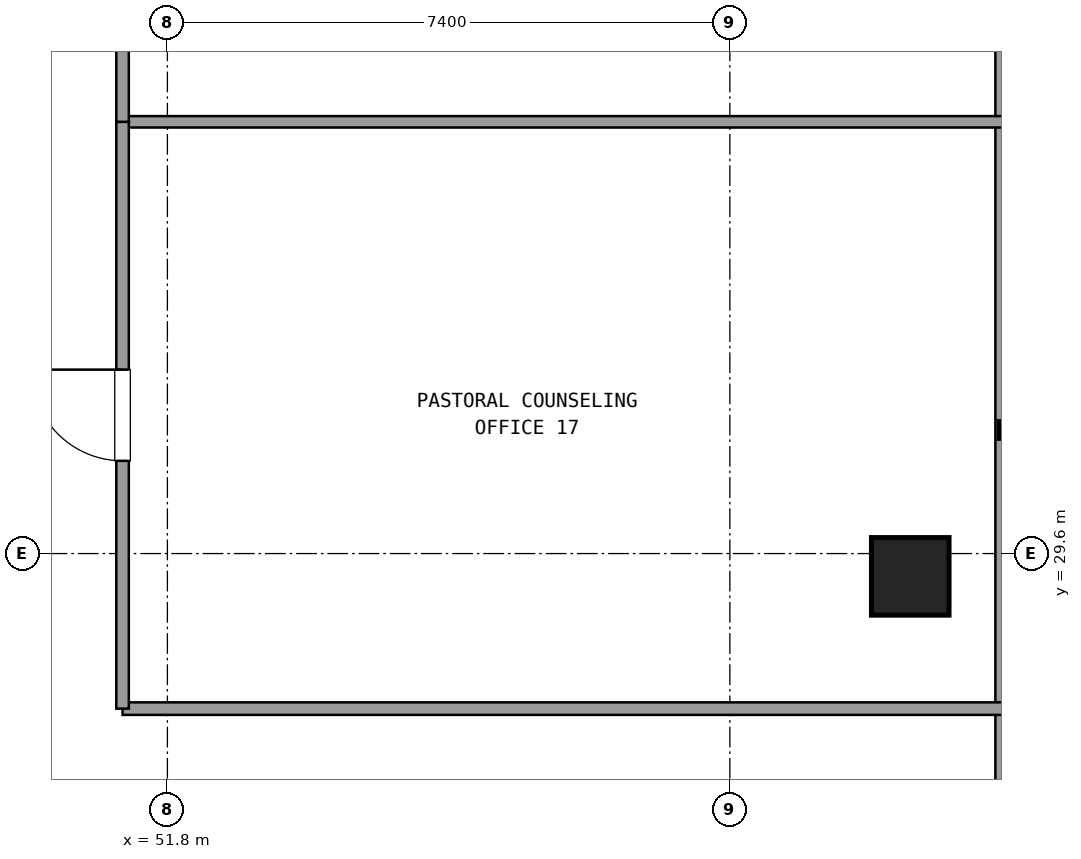
"""IFC4 building model, lengths in metres.
Left out: names, types, materials, properties, quantities, classifications, styles, units other than length and angle.
Written with IfcOpenShell. Run it as: python <this file> out.ifc"""

import sys

from ifc_helpers import new_model, si_unit, direction, frame, frame_2d, origin, origin_2d, place, context, subcontext, project, spatial, rectangle, extrude, element, fill, save


model = new_model("IFC4")
c1 = context("Model", 3, precision=1e-05, world=origin(), true_north=direction((0.0, 1.0)))
c2 = subcontext(c1, "Body", "Model", "MODEL_VIEW")
j1 = project(units=[si_unit("LENGTHUNIT", "METRE"), si_unit("PLANEANGLEUNIT", "RADIAN")], contexts=[c1])
p1 = place(None, origin())
s1 = spatial("IfcSite", under=j1, at=p1, CompositionType="ELEMENT")
p2 = place(p1, origin())
s2 = spatial("IfcBuilding", under=s1, at=p2, CompositionType="ELEMENT")
p3 = place(p2, frame((0.0, 0.0, 99.18)))
s3 = spatial("IfcBuildingStorey", under=s2, at=p3, CompositionType="ELEMENT", Elevation=99.18)
p4 = place(p3, frame((61.573, 29.3, 0.021), z_axis=(-0.084573087246, 0.0, 0.99641727851), x_axis=(0.0, -1.0, 0.0)))
e1 = element("IfcColumn", 1, at=p4, inside=s3, PredefinedType="COLUMN", context=c2, shape_type="SweptSolid", body=[
    extrude(rectangle(XDim=1.02, YDim=1.02, at=origin_2d()), origin(), (0.0, 0.0, 1.0), 3.571),
])
p5 = place(p3, frame((62.813, 9.921, 0.0), z_axis=(0.0, 0.0, 1.0), x_axis=(0.0, 1.0, 0.0)))
e2 = element("IfcWall", 2, at=p5, inside=s3, PredefinedType="SOLIDWALL", context=c2, shape_type="SweptSolid", body=[
    extrude(rectangle(XDim=31.958, YDim=0.24, at=frame_2d((15.979, 0.0))), origin(), (0.0, 0.0, 1.0), 0.85),
])
p6 = place(p3, frame((51.21, 27.56, 0.0), z_axis=(0.0, 0.0, 1.0), x_axis=(1.0, 0.0, 0.0)))
e3 = element("IfcWall", 3, at=p6, inside=s3, PredefinedType="PARTITIONING", context=c2, shape_type="SweptSolid", body=[
    extrude(rectangle(XDim=11.583, YDim=0.165, at=frame_2d((5.792, 0.0))), origin(), (0.0, 0.0, 1.0), 2.61),
])
p7 = place(p3, frame((51.21, 35.28, 0.0), z_axis=(0.0, 0.0, 1.0), x_axis=(1.0, 0.0, 0.0)))
e4 = element("IfcWall", 4, at=p7, inside=s3, PredefinedType="PARTITIONING", context=c2, shape_type="SweptSolid", body=[
    extrude(rectangle(XDim=11.583, YDim=0.15, at=frame_2d((5.792, 0.0))), origin(), (0.0, 0.0, 1.0), 2.61),
])
p8 = place(p3, frame((51.21, 27.56, 0.0), z_axis=(0.0, 0.0, 1.0), x_axis=(0.0, 1.0, 0.0)))
e5 = element("IfcWall", 5, at=p8, inside=s3, PredefinedType="PARTITIONING", context=c2, shape_type="SweptSolid", body=[
    extrude(rectangle(XDim=7.72, YDim=0.165, at=frame_2d((3.86, 0.0))), origin(), (0.0, 0.0, 1.0), 2.61),
])
p9 = place(p8, frame((3.26, 0.0, 0.0)))
e6 = element("IfcOpeningElement", 6, at=p9, cuts=e5, PredefinedType="OPENING", context=c2, shape_type="SweptSolid", body=[
    extrude(rectangle(XDim=1.2, YDim=2.15, at=frame_2d((0.6, 1.075))), frame((0.0, 0.093, 0.0), z_axis=(0.0, -1.0, 0.0), x_axis=(1.0, 0.0, 0.0)), (0.0, 0.0, 1.0), 0.185),
])
p10 = place(p3, frame((51.21, 35.28, 0.0), z_axis=(0.0, 0.0, 1.0), x_axis=(0.0, 1.0, 0.0)))
e7 = element("IfcWall", 7, at=p10, inside=s3, PredefinedType="PARTITIONING", context=c2, shape_type="SweptSolid", body=[
    extrude(rectangle(XDim=6.066, YDim=0.165, at=frame_2d((3.033, 0.0))), origin(), (0.0, 0.0, 1.0), 2.61),
])
p11 = place(p10, frame((2.433, 0.0, 0.0)))
e8 = element("IfcOpeningElement", 8, at=p11, cuts=e7, PredefinedType="OPENING", context=c2, shape_type="SweptSolid", body=[
    extrude(rectangle(XDim=1.2, YDim=2.15, at=frame_2d((0.6, 1.075))), frame((0.0, 0.093, 0.0), z_axis=(0.0, -1.0, 0.0), x_axis=(1.0, 0.0, 0.0)), (0.0, 0.0, 1.0), 0.185),
])
p12 = place(p9, origin())
e9 = element("IfcDoor", 9, at=p12, inside=s3, OperationType="SINGLE_SWING_RIGHT", PredefinedType="DOOR", context=c2, shape_type="SweptSolid", body=[
    extrude(rectangle(XDim=1.2, YDim=2.15, at=frame_2d((0.6, 1.075))), frame((0.0, 0.025, 0.0), z_axis=(0.0, -1.0, 0.0), x_axis=(1.0, 0.0, 0.0)), (0.0, 0.0, 1.0), 0.05),
])
fill(e6, e9)
save(model, sys.argv[1])
